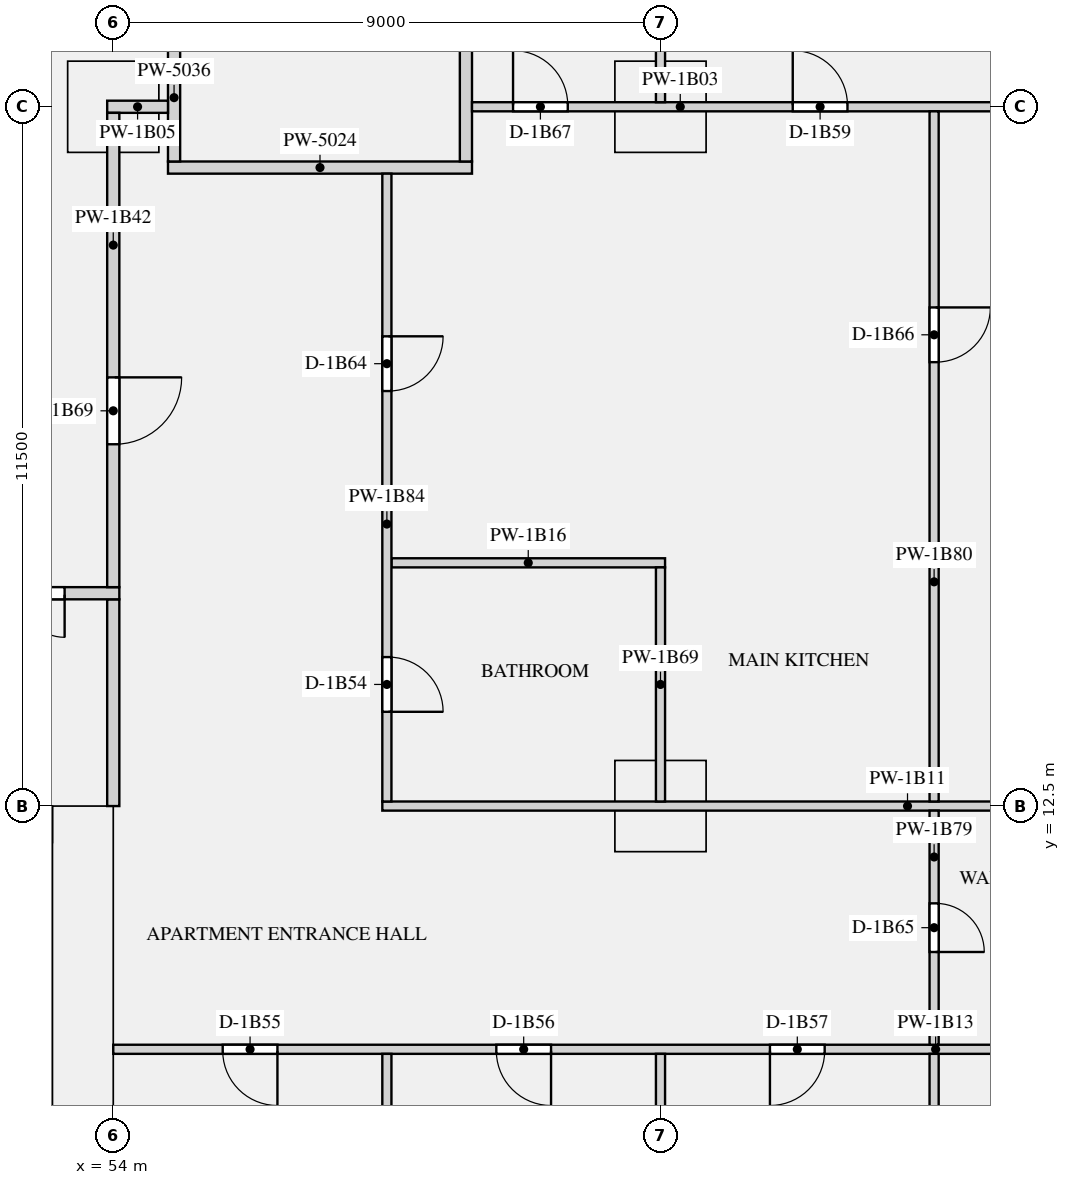
"""IFC4 building model, lengths in metres.
Left out: names, types, materials, properties, quantities, classifications, styles, units other than length and angle.
Written with IfcOpenShell. Run it as: python <this file> out.ifc"""

import sys

from ifc_helpers import new_model, si_unit, direction, frame, frame_2d, origin, origin_2d, place, context, subcontext, project, spatial, rectangle, extrude, element, fill, save


model = new_model("IFC4")
c1 = context("Model", 3, precision=1e-05, world=origin(), true_north=direction((0.0, 1.0)))
c2 = subcontext(c1, "Body", "Model", "MODEL_VIEW")
j1 = project(units=[si_unit("LENGTHUNIT", "METRE"), si_unit("PLANEANGLEUNIT", "RADIAN")], contexts=[c1])
p1 = place(None, origin())
s1 = spatial("IfcSite", under=j1, at=p1, CompositionType="ELEMENT")
p2 = place(p1, origin())
s2 = spatial("IfcBuilding", under=s1, at=p2, CompositionType="ELEMENT")
p3 = place(p2, frame((0.0, 0.0, 28.95)))
s3 = spatial("IfcBuildingStorey", under=s2, at=p3, CompositionType="ELEMENT", Elevation=28.95)
for number, where, z_axis, x_axis in (
    (1, (54.0, 24.0, 0.0), (0.0, 0.0, 1.0), (1.0, 0.0, 0.0)),
    (2, (63.0, 24.0, 0.0), (0.0, 0.0, 1.0), (1.0, 0.0, 0.0)),
    (3, (63.0, 12.5, 0.0), (0.0, 0.0, 1.0), (1.0, 0.0, 0.0)),
):
    element("IfcColumn", number, at=place(p3, frame(where, z_axis=z_axis, x_axis=x_axis)), inside=s3, PredefinedType="COLUMN", context=c2, shape_type="SweptSolid", body=[
        extrude(rectangle(XDim=1.5, YDim=1.5, at=origin_2d()), origin(), (0.0, 0.0, 1.0), 3.15),
    ])
p4 = place(p3, frame((53.5, 0.0, 0.0), z_axis=(0.0, 0.0, 1.0), x_axis=(0.0, 1.0, 0.0)))
e4 = element("IfcWall", 4, at=p4, inside=s3, PredefinedType="SHEAR", context=c2, shape_type="SweptSolid", body=[
    extrude(rectangle(XDim=12.5, YDim=1.0, at=frame_2d((6.25, 0.0))), origin(), (0.0, 0.0, 1.0), 3.15),
])
p5 = place(p3, frame((54.9, 23.0, 0.0), z_axis=(0.0, 0.0, 1.0), x_axis=(1.0, 0.0, 0.0)))
e5 = element("IfcWall", 5, at=p5, inside=s3, PredefinedType="PARTITIONING", context=c2, shape_type="SweptSolid", body=[
    extrude(rectangle(XDim=5.0, YDim=0.2, at=frame_2d((2.5, 0.0))), origin(), (0.0, 0.0, 1.0), 2.83),
])
p6 = place(p3, frame((54.0, 12.5, 0.0), z_axis=(0.0, 0.0, 1.0), x_axis=(0.0, 1.0, 0.0)))
e6 = element("IfcWall", 6, at=p6, inside=s3, PredefinedType="PARTITIONING", context=c2, shape_type="SweptSolid", body=[
    extrude(rectangle(XDim=3.4, YDim=0.2, at=frame_2d((1.7, 0.0))), origin(), (0.0, 0.0, 1.0), 2.83),
])
p7 = place(p3, frame((55.0, 23.1, 0.0), z_axis=(0.0, 0.0, 1.0), x_axis=(0.0, 1.0, 0.0)))
e7 = element("IfcWall", 7, at=p7, inside=s3, PredefinedType="PARTITIONING", context=c2, shape_type="SweptSolid", body=[
    extrude(rectangle(XDim=3.8, YDim=0.2, at=frame_2d((1.9, 0.0))), origin(), (0.0, 0.0, 1.0), 2.83),
])
p8 = place(p7, frame((2.1, 0.0, 0.0)))
e8 = element("IfcOpeningElement", 8, at=p8, cuts=e7, PredefinedType="OPENING", context=c2, shape_type="SweptSolid", body=[
    extrude(rectangle(XDim=1.2, YDim=2.1, at=frame_2d((0.6, 1.05))), frame((0.0, 0.11, 0.0), z_axis=(0.0, -1.0, 0.0), x_axis=(1.0, 0.0, 0.0)), (0.0, 0.0, 1.0), 0.22),
])
p9 = place(p3, frame((59.8, 23.1, 0.0), z_axis=(0.0, 0.0, 1.0), x_axis=(0.0, 1.0, 0.0)))
e9 = element("IfcWall", 9, at=p9, inside=s3, PredefinedType="PARTITIONING", context=c2, shape_type="SweptSolid", body=[
    extrude(rectangle(XDim=3.9, YDim=0.2, at=frame_2d((1.95, 0.0))), origin(), (0.0, 0.0, 1.0), 2.83),
])
p10 = place(p3, frame((59.9, 24.0, 0.0), z_axis=(0.0, 0.0, 1.0), x_axis=(1.0, 0.0, 0.0)))
e10 = element("IfcWall", 10, at=p10, inside=s3, PredefinedType="PARTITIONING", context=c2, shape_type="SweptSolid", body=[
    extrude(rectangle(XDim=13.3, YDim=0.15, at=frame_2d((6.65, 0.0))), origin(), (0.0, 0.0, 1.0), 2.83),
])
p11 = place(p10, frame((5.275, 0.0, 0.0)))
e11 = element("IfcOpeningElement", 11, at=p11, cuts=e10, PredefinedType="OPENING", context=c2, shape_type="SweptSolid", body=[
    extrude(rectangle(XDim=0.9, YDim=2.1, at=frame_2d((0.45, 1.05))), frame((0.0, 0.085, 0.0), z_axis=(0.0, -1.0, 0.0), x_axis=(1.0, 0.0, 0.0)), (0.0, 0.0, 1.0), 0.17),
])
p12 = place(p10, frame((8.725, 0.0, 0.0)))
e12 = element("IfcOpeningElement", 12, at=p12, cuts=e10, PredefinedType="OPENING", context=c2, shape_type="SweptSolid", body=[
    extrude(rectangle(XDim=1.5, YDim=2.1, at=frame_2d((0.75, 1.05))), frame((0.0, 0.085, 0.0), z_axis=(0.0, -1.0, 0.0), x_axis=(1.0, 0.0, 0.0)), (0.0, 0.0, 1.0), 0.17),
])
p13 = place(p10, frame((0.675, 0.0, 0.0)))
e13 = element("IfcOpeningElement", 13, at=p13, cuts=e10, PredefinedType="OPENING", context=c2, shape_type="SweptSolid", body=[
    extrude(rectangle(XDim=0.9, YDim=2.1, at=frame_2d((0.45, 1.05))), frame((0.0, 0.085, 0.0), z_axis=(0.0, -1.0, 0.0), x_axis=(1.0, 0.0, 0.0)), (0.0, 0.0, 1.0), 0.17),
])
p14 = place(p3, frame((53.9, 24.0, 0.0), z_axis=(0.0, 0.0, 1.0), x_axis=(1.0, 0.0, 0.0)))
e14 = element("IfcWall", 14, at=p14, inside=s3, PredefinedType="PARTITIONING", context=c2, shape_type="SweptSolid", body=[
    extrude(rectangle(XDim=1.0, YDim=0.2, at=frame_2d((0.5, 0.0))), origin(), (0.0, 0.0, 1.0), 2.83),
])
p15 = place(p3, frame((58.425, 12.5, 0.0), z_axis=(0.0, 0.0, 1.0), x_axis=(1.0, 0.0, 0.0)))
e15 = element("IfcWall", 15, at=p15, inside=s3, PredefinedType="PARTITIONING", context=c2, shape_type="SweptSolid", body=[
    extrude(rectangle(XDim=17.275, YDim=0.15, at=frame_2d((8.637, 0.0))), origin(), (0.0, 0.0, 1.0), 2.83),
])
p16 = place(p3, frame((54.0, 8.5, 0.0), z_axis=(0.0, 0.0, 1.0), x_axis=(1.0, 0.0, 0.0)))
e16 = element("IfcWall", 16, at=p16, inside=s3, PredefinedType="PARTITIONING", context=c2, shape_type="SweptSolid", body=[
    extrude(rectangle(XDim=21.7, YDim=0.15, at=frame_2d((10.85, 0.0))), origin(), (0.0, 0.0, 1.0), 2.83),
])
p17 = place(p16, frame((1.8, 0.0, 0.0)))
e17 = element("IfcOpeningElement", 17, at=p17, cuts=e16, PredefinedType="OPENING", context=c2, shape_type="SweptSolid", body=[
    extrude(rectangle(XDim=0.9, YDim=2.1, at=frame_2d((0.45, 1.05))), frame((0.0, 0.085, 0.0), z_axis=(0.0, -1.0, 0.0), x_axis=(1.0, 0.0, 0.0)), (0.0, 0.0, 1.0), 0.17),
])
p18 = place(p16, frame((6.3, 0.0, 0.0)))
e18 = element("IfcOpeningElement", 18, at=p18, cuts=e16, PredefinedType="OPENING", context=c2, shape_type="SweptSolid", body=[
    extrude(rectangle(XDim=0.9, YDim=2.1, at=frame_2d((0.45, 1.05))), frame((0.0, 0.085, 0.0), z_axis=(0.0, -1.0, 0.0), x_axis=(1.0, 0.0, 0.0)), (0.0, 0.0, 1.0), 0.17),
])
p19 = place(p16, frame((10.8, 0.0, 0.0)))
e19 = element("IfcOpeningElement", 19, at=p19, cuts=e16, PredefinedType="OPENING", context=c2, shape_type="SweptSolid", body=[
    extrude(rectangle(XDim=0.9, YDim=2.1, at=frame_2d((0.45, 1.05))), frame((0.0, 0.085, 0.0), z_axis=(0.0, -1.0, 0.0), x_axis=(1.0, 0.0, 0.0)), (0.0, 0.0, 1.0), 0.17),
])
p20 = place(p16, frame((19.525, 0.0, 0.0)))
e20 = element("IfcOpeningElement", 20, at=p20, cuts=e16, PredefinedType="OPENING", context=c2, shape_type="SweptSolid", body=[
    extrude(rectangle(XDim=0.8, YDim=2.1, at=frame_2d((0.4, 1.05))), frame((0.0, 0.085, 0.0), z_axis=(0.0, -1.0, 0.0), x_axis=(1.0, 0.0, 0.0)), (0.0, 0.0, 1.0), 0.17),
])
p21 = place(p16, frame((15.35, 0.0, 0.0)))
e21 = element("IfcOpeningElement", 21, at=p21, cuts=e16, PredefinedType="OPENING", context=c2, shape_type="SweptSolid", body=[
    extrude(rectangle(XDim=0.8, YDim=2.1, at=frame_2d((0.4, 1.05))), frame((0.0, 0.085, 0.0), z_axis=(0.0, -1.0, 0.0), x_axis=(1.0, 0.0, 0.0)), (0.0, 0.0, 1.0), 0.17),
])
p22 = place(p3, frame((58.575, 16.5, 0.0), z_axis=(0.0, 0.0, 1.0), x_axis=(1.0, 0.0, 0.0)))
e22 = element("IfcWall", 22, at=p22, inside=s3, PredefinedType="PARTITIONING", context=c2, shape_type="SweptSolid", body=[
    extrude(rectangle(XDim=4.5, YDim=0.15, at=frame_2d((2.25, 0.0))), origin(), (0.0, 0.0, 1.0), 2.83),
])
p23 = place(p3, frame((17.9, 16.0, 0.0), z_axis=(0.0, 0.0, 1.0), x_axis=(1.0, 0.0, 0.0)))
e23 = element("IfcWall", 23, at=p23, inside=s3, PredefinedType="PARTITIONING", context=c2, shape_type="SweptSolid", body=[
    extrude(rectangle(XDim=36.2, YDim=0.2, at=frame_2d((18.1, 0.0))), origin(), (0.0, 0.0, 1.0), 2.83),
])
p24 = place(p23, frame((0.9, 0.0, 0.0)))
e24 = element("IfcOpeningElement", 24, at=p24, cuts=e23, PredefinedType="OPENING", context=c2, shape_type="SweptSolid", body=[
    extrude(rectangle(XDim=1.4, YDim=2.1, at=frame_2d((0.7, 1.05))), frame((0.0, 0.11, 0.0), z_axis=(0.0, -1.0, 0.0), x_axis=(1.0, 0.0, 0.0)), (0.0, 0.0, 1.0), 0.22),
])
p25 = place(p23, frame((33.9, 0.0, 0.0)))
e25 = element("IfcOpeningElement", 25, at=p25, cuts=e23, PredefinedType="OPENING", context=c2, shape_type="SweptSolid", body=[
    extrude(rectangle(XDim=1.4, YDim=2.1, at=frame_2d((0.7, 1.05))), frame((0.0, 0.11, 0.0), z_axis=(0.0, -1.0, 0.0), x_axis=(1.0, 0.0, 0.0)), (0.0, 0.0, 1.0), 0.22),
])
p26 = place(p3, frame((54.0, 16.1, 0.0), z_axis=(0.0, 0.0, 1.0), x_axis=(0.0, 1.0, 0.0)))
e26 = element("IfcWall", 26, at=p26, inside=s3, PredefinedType="PARTITIONING", context=c2, shape_type="SweptSolid", body=[
    extrude(rectangle(XDim=7.8, YDim=0.2, at=frame_2d((3.9, 0.0))), origin(), (0.0, 0.0, 1.0), 2.83),
])
p27 = place(p26, frame((2.35, 0.0, 0.0)))
e27 = element("IfcOpeningElement", 27, at=p27, cuts=e26, PredefinedType="OPENING", context=c2, shape_type="SweptSolid", body=[
    extrude(rectangle(XDim=1.1, YDim=2.1, at=frame_2d((0.55, 1.05))), frame((0.0, 0.11, 0.0), z_axis=(0.0, -1.0, 0.0), x_axis=(1.0, 0.0, 0.0)), (0.0, 0.0, 1.0), 0.22),
])
p28 = place(p3, frame((63.0, 0.8, 0.0), z_axis=(0.0, 0.0, 1.0), x_axis=(0.0, 1.0, 0.0)))
e28 = element("IfcWall", 28, at=p28, inside=s3, PredefinedType="PARTITIONING", context=c2, shape_type="SweptSolid", body=[
    extrude(rectangle(XDim=7.625, YDim=0.15, at=frame_2d((3.812, 0.0))), origin(), (0.0, 0.0, 1.0), 2.83),
])
p29 = place(p3, frame((63.0, 12.575, 0.0), z_axis=(0.0, 0.0, 1.0), x_axis=(0.0, 1.0, 0.0)))
e29 = element("IfcWall", 29, at=p29, inside=s3, PredefinedType="PARTITIONING", context=c2, shape_type="SweptSolid", body=[
    extrude(rectangle(XDim=3.85, YDim=0.15, at=frame_2d((1.925, 0.0))), origin(), (0.0, 0.0, 1.0), 2.83),
])
p30 = place(p3, frame((63.0, 24.075, 0.0), z_axis=(0.0, 0.0, 1.0), x_axis=(0.0, 1.0, 0.0)))
e30 = element("IfcWall", 30, at=p30, inside=s3, PredefinedType="PARTITIONING", context=c2, shape_type="SweptSolid", body=[
    extrude(rectangle(XDim=4.35, YDim=0.15, at=frame_2d((2.175, 0.0))), origin(), (0.0, 0.0, 1.0), 2.83),
])
p31 = place(p30, frame((2.1, 0.0, 0.0)))
e31 = element("IfcOpeningElement", 31, at=p31, cuts=e30, PredefinedType="OPENING", context=c2, shape_type="SweptSolid", body=[
    extrude(rectangle(XDim=0.9, YDim=2.1, at=frame_2d((0.45, 1.05))), frame((0.0, 0.085, 0.0), z_axis=(0.0, -1.0, 0.0), x_axis=(1.0, 0.0, 0.0)), (0.0, 0.0, 1.0), 0.17),
])
p32 = place(p3, frame((67.5, 0.8, 0.0), z_axis=(0.0, 0.0, 1.0), x_axis=(0.0, 1.0, 0.0)))
e32 = element("IfcWall", 32, at=p32, inside=s3, PredefinedType="PARTITIONING", context=c2, shape_type="SweptSolid", body=[
    extrude(rectangle(XDim=7.625, YDim=0.15, at=frame_2d((3.812, 0.0))), origin(), (0.0, 0.0, 1.0), 2.83),
])
p33 = place(p3, frame((67.5, 8.575, 0.0), z_axis=(0.0, 0.0, 1.0), x_axis=(0.0, 1.0, 0.0)))
e33 = element("IfcWall", 33, at=p33, inside=s3, PredefinedType="PARTITIONING", context=c2, shape_type="SweptSolid", body=[
    extrude(rectangle(XDim=3.85, YDim=0.15, at=frame_2d((1.925, 0.0))), origin(), (0.0, 0.0, 1.0), 2.83),
])
p34 = place(p33, frame((1.525, 0.0, 0.0)))
e34 = element("IfcOpeningElement", 34, at=p34, cuts=e33, PredefinedType="OPENING", context=c2, shape_type="SweptSolid", body=[
    extrude(rectangle(XDim=0.8, YDim=2.1, at=frame_2d((0.4, 1.05))), frame((0.0, 0.085, 0.0), z_axis=(0.0, -1.0, 0.0), x_axis=(1.0, 0.0, 0.0)), (0.0, 0.0, 1.0), 0.17),
])
p35 = place(p3, frame((67.5, 12.575, 0.0), z_axis=(0.0, 0.0, 1.0), x_axis=(0.0, 1.0, 0.0)))
e35 = element("IfcWall", 35, at=p35, inside=s3, PredefinedType="PARTITIONING", context=c2, shape_type="SweptSolid", body=[
    extrude(rectangle(XDim=11.35, YDim=0.15, at=frame_2d((5.675, 0.0))), origin(), (0.0, 0.0, 1.0), 2.83),
])
p36 = place(p35, frame((7.225, 0.0, 0.0)))
e36 = element("IfcOpeningElement", 36, at=p36, cuts=e35, PredefinedType="OPENING", context=c2, shape_type="SweptSolid", body=[
    extrude(rectangle(XDim=0.9, YDim=2.1, at=frame_2d((0.45, 1.05))), frame((0.0, 0.085, 0.0), z_axis=(0.0, -1.0, 0.0), x_axis=(1.0, 0.0, 0.0)), (0.0, 0.0, 1.0), 0.17),
])
p37 = place(p3, frame((58.5, 0.8, 0.0), z_axis=(0.0, 0.0, 1.0), x_axis=(0.0, 1.0, 0.0)))
e37 = element("IfcWall", 37, at=p37, inside=s3, PredefinedType="PARTITIONING", context=c2, shape_type="SweptSolid", body=[
    extrude(rectangle(XDim=7.625, YDim=0.15, at=frame_2d((3.812, 0.0))), origin(), (0.0, 0.0, 1.0), 2.83),
])
p38 = place(p3, frame((58.5, 12.575, 0.0), z_axis=(0.0, 0.0, 1.0), x_axis=(0.0, 1.0, 0.0)))
e38 = element("IfcWall", 38, at=p38, inside=s3, PredefinedType="PARTITIONING", context=c2, shape_type="SweptSolid", body=[
    extrude(rectangle(XDim=10.325, YDim=0.15, at=frame_2d((5.163, 0.0))), origin(), (0.0, 0.0, 1.0), 2.83),
])
p39 = place(p38, frame((1.475, 0.0, 0.0)))
e39 = element("IfcOpeningElement", 39, at=p39, cuts=e38, PredefinedType="OPENING", context=c2, shape_type="SweptSolid", body=[
    extrude(rectangle(XDim=0.9, YDim=2.1, at=frame_2d((0.45, 1.05))), frame((0.0, 0.085, 0.0), z_axis=(0.0, -1.0, 0.0), x_axis=(1.0, 0.0, 0.0)), (0.0, 0.0, 1.0), 0.17),
])
p40 = place(p38, frame((6.75, 0.0, 0.0)))
e40 = element("IfcOpeningElement", 40, at=p40, cuts=e38, PredefinedType="OPENING", context=c2, shape_type="SweptSolid", body=[
    extrude(rectangle(XDim=0.9, YDim=2.1, at=frame_2d((0.45, 1.05))), frame((0.0, 0.085, 0.0), z_axis=(0.0, -1.0, 0.0), x_axis=(1.0, 0.0, 0.0)), (0.0, 0.0, 1.0), 0.17),
])
p41 = place(p25, frame((1.4, 0.0, 0.0), z_axis=(0.0, 0.0, 1.0), x_axis=(-1.0, 0.0, 0.0)))
e41 = element("IfcDoor", 41, at=p41, inside=s3, OperationType="DOUBLE_DOOR_SINGLE_SWING", PredefinedType="DOOR", context=c2, shape_type="SweptSolid", body=[
    extrude(rectangle(XDim=1.4, YDim=2.1, at=frame_2d((0.7, 1.05))), frame((0.0, 0.025, 0.0), z_axis=(0.0, -1.0, 0.0), x_axis=(1.0, 0.0, 0.0)), (0.0, 0.0, 1.0), 0.05),
])
fill(e25, e41)
p42 = place(p39, frame((0.9, 0.0, 0.0), z_axis=(0.0, 0.0, 1.0), x_axis=(-1.0, 0.0, 0.0)))
e42 = element("IfcDoor", 42, at=p42, inside=s3, OperationType="SINGLE_SWING_RIGHT", PredefinedType="DOOR", context=c2, shape_type="SweptSolid", body=[
    extrude(rectangle(XDim=0.9, YDim=2.1, at=frame_2d((0.45, 1.05))), frame((0.0, 0.025, 0.0), z_axis=(0.0, -1.0, 0.0), x_axis=(1.0, 0.0, 0.0)), (0.0, 0.0, 1.0), 0.05),
])
fill(e39, e42)
p43 = place(p17, frame((0.9, 0.0, 0.0), z_axis=(0.0, 0.0, 1.0), x_axis=(-1.0, 0.0, 0.0)))
e43 = element("IfcDoor", 43, at=p43, inside=s3, OperationType="SINGLE_SWING_LEFT", PredefinedType="DOOR", context=c2, shape_type="SweptSolid", body=[
    extrude(rectangle(XDim=0.9, YDim=2.1, at=frame_2d((0.45, 1.05))), frame((0.0, 0.025, 0.0), z_axis=(0.0, -1.0, 0.0), x_axis=(1.0, 0.0, 0.0)), (0.0, 0.0, 1.0), 0.05),
])
fill(e17, e43)
p44 = place(p18, frame((0.9, 0.0, 0.0), z_axis=(0.0, 0.0, 1.0), x_axis=(-1.0, 0.0, 0.0)))
e44 = element("IfcDoor", 44, at=p44, inside=s3, OperationType="SINGLE_SWING_LEFT", PredefinedType="DOOR", context=c2, shape_type="SweptSolid", body=[
    extrude(rectangle(XDim=0.9, YDim=2.1, at=frame_2d((0.45, 1.05))), frame((0.0, 0.025, 0.0), z_axis=(0.0, -1.0, 0.0), x_axis=(1.0, 0.0, 0.0)), (0.0, 0.0, 1.0), 0.05),
])
fill(e18, e44)
p45 = place(p19, frame((0.9, 0.0, 0.0), z_axis=(0.0, 0.0, 1.0), x_axis=(-1.0, 0.0, 0.0)))
e45 = element("IfcDoor", 45, at=p45, inside=s3, OperationType="SINGLE_SWING_RIGHT", PredefinedType="DOOR", context=c2, shape_type="SweptSolid", body=[
    extrude(rectangle(XDim=0.9, YDim=2.1, at=frame_2d((0.45, 1.05))), frame((0.0, 0.025, 0.0), z_axis=(0.0, -1.0, 0.0), x_axis=(1.0, 0.0, 0.0)), (0.0, 0.0, 1.0), 0.05),
])
fill(e19, e45)
p46 = place(p11, origin())
e46 = element("IfcDoor", 46, at=p46, inside=s3, OperationType="SINGLE_SWING_LEFT", PredefinedType="DOOR", context=c2, shape_type="SweptSolid", body=[
    extrude(rectangle(XDim=0.9, YDim=2.1, at=frame_2d((0.45, 1.05))), frame((0.0, 0.025, 0.0), z_axis=(0.0, -1.0, 0.0), x_axis=(1.0, 0.0, 0.0)), (0.0, 0.0, 1.0), 0.05),
])
fill(e11, e46)
p47 = place(p40, frame((0.9, 0.0, 0.0), z_axis=(0.0, 0.0, 1.0), x_axis=(-1.0, 0.0, 0.0)))
e47 = element("IfcDoor", 47, at=p47, inside=s3, OperationType="SINGLE_SWING_LEFT", PredefinedType="DOOR", context=c2, shape_type="SweptSolid", body=[
    extrude(rectangle(XDim=0.9, YDim=2.1, at=frame_2d((0.45, 1.05))), frame((0.0, 0.025, 0.0), z_axis=(0.0, -1.0, 0.0), x_axis=(1.0, 0.0, 0.0)), (0.0, 0.0, 1.0), 0.05),
])
fill(e40, e47)
p48 = place(p34, frame((0.8, 0.0, 0.0), z_axis=(0.0, 0.0, 1.0), x_axis=(-1.0, 0.0, 0.0)))
e48 = element("IfcDoor", 48, at=p48, inside=s3, OperationType="SINGLE_SWING_RIGHT", PredefinedType="DOOR", context=c2, shape_type="SweptSolid", body=[
    extrude(rectangle(XDim=0.8, YDim=2.1, at=frame_2d((0.4, 1.05))), frame((0.0, 0.025, 0.0), z_axis=(0.0, -1.0, 0.0), x_axis=(1.0, 0.0, 0.0)), (0.0, 0.0, 1.0), 0.05),
])
fill(e34, e48)
p49 = place(p36, frame((0.9, 0.0, 0.0), z_axis=(0.0, 0.0, 1.0), x_axis=(-1.0, 0.0, 0.0)))
e49 = element("IfcDoor", 49, at=p49, inside=s3, OperationType="SINGLE_SWING_LEFT", PredefinedType="DOOR", context=c2, shape_type="SweptSolid", body=[
    extrude(rectangle(XDim=0.9, YDim=2.1, at=frame_2d((0.45, 1.05))), frame((0.0, 0.025, 0.0), z_axis=(0.0, -1.0, 0.0), x_axis=(1.0, 0.0, 0.0)), (0.0, 0.0, 1.0), 0.05),
])
fill(e36, e49)
p50 = place(p13, origin())
e50 = element("IfcDoor", 50, at=p50, inside=s3, OperationType="SINGLE_SWING_LEFT", PredefinedType="DOOR", context=c2, shape_type="SweptSolid", body=[
    extrude(rectangle(XDim=0.9, YDim=2.1, at=frame_2d((0.45, 1.05))), frame((0.0, 0.025, 0.0), z_axis=(0.0, -1.0, 0.0), x_axis=(1.0, 0.0, 0.0)), (0.0, 0.0, 1.0), 0.05),
])
fill(e13, e50)
p51 = place(p27, frame((1.1, 0.0, 0.0), z_axis=(0.0, 0.0, 1.0), x_axis=(-1.0, 0.0, 0.0)))
e51 = element("IfcDoor", 51, at=p51, inside=s3, OperationType="SINGLE_SWING_LEFT", PredefinedType="DOOR", context=c2, shape_type="SweptSolid", body=[
    extrude(rectangle(XDim=1.1, YDim=2.1, at=frame_2d((0.55, 1.05))), frame((0.0, 0.025, 0.0), z_axis=(0.0, -1.0, 0.0), x_axis=(1.0, 0.0, 0.0)), (0.0, 0.0, 1.0), 0.05),
])
fill(e27, e51)
save(model, sys.argv[1])
